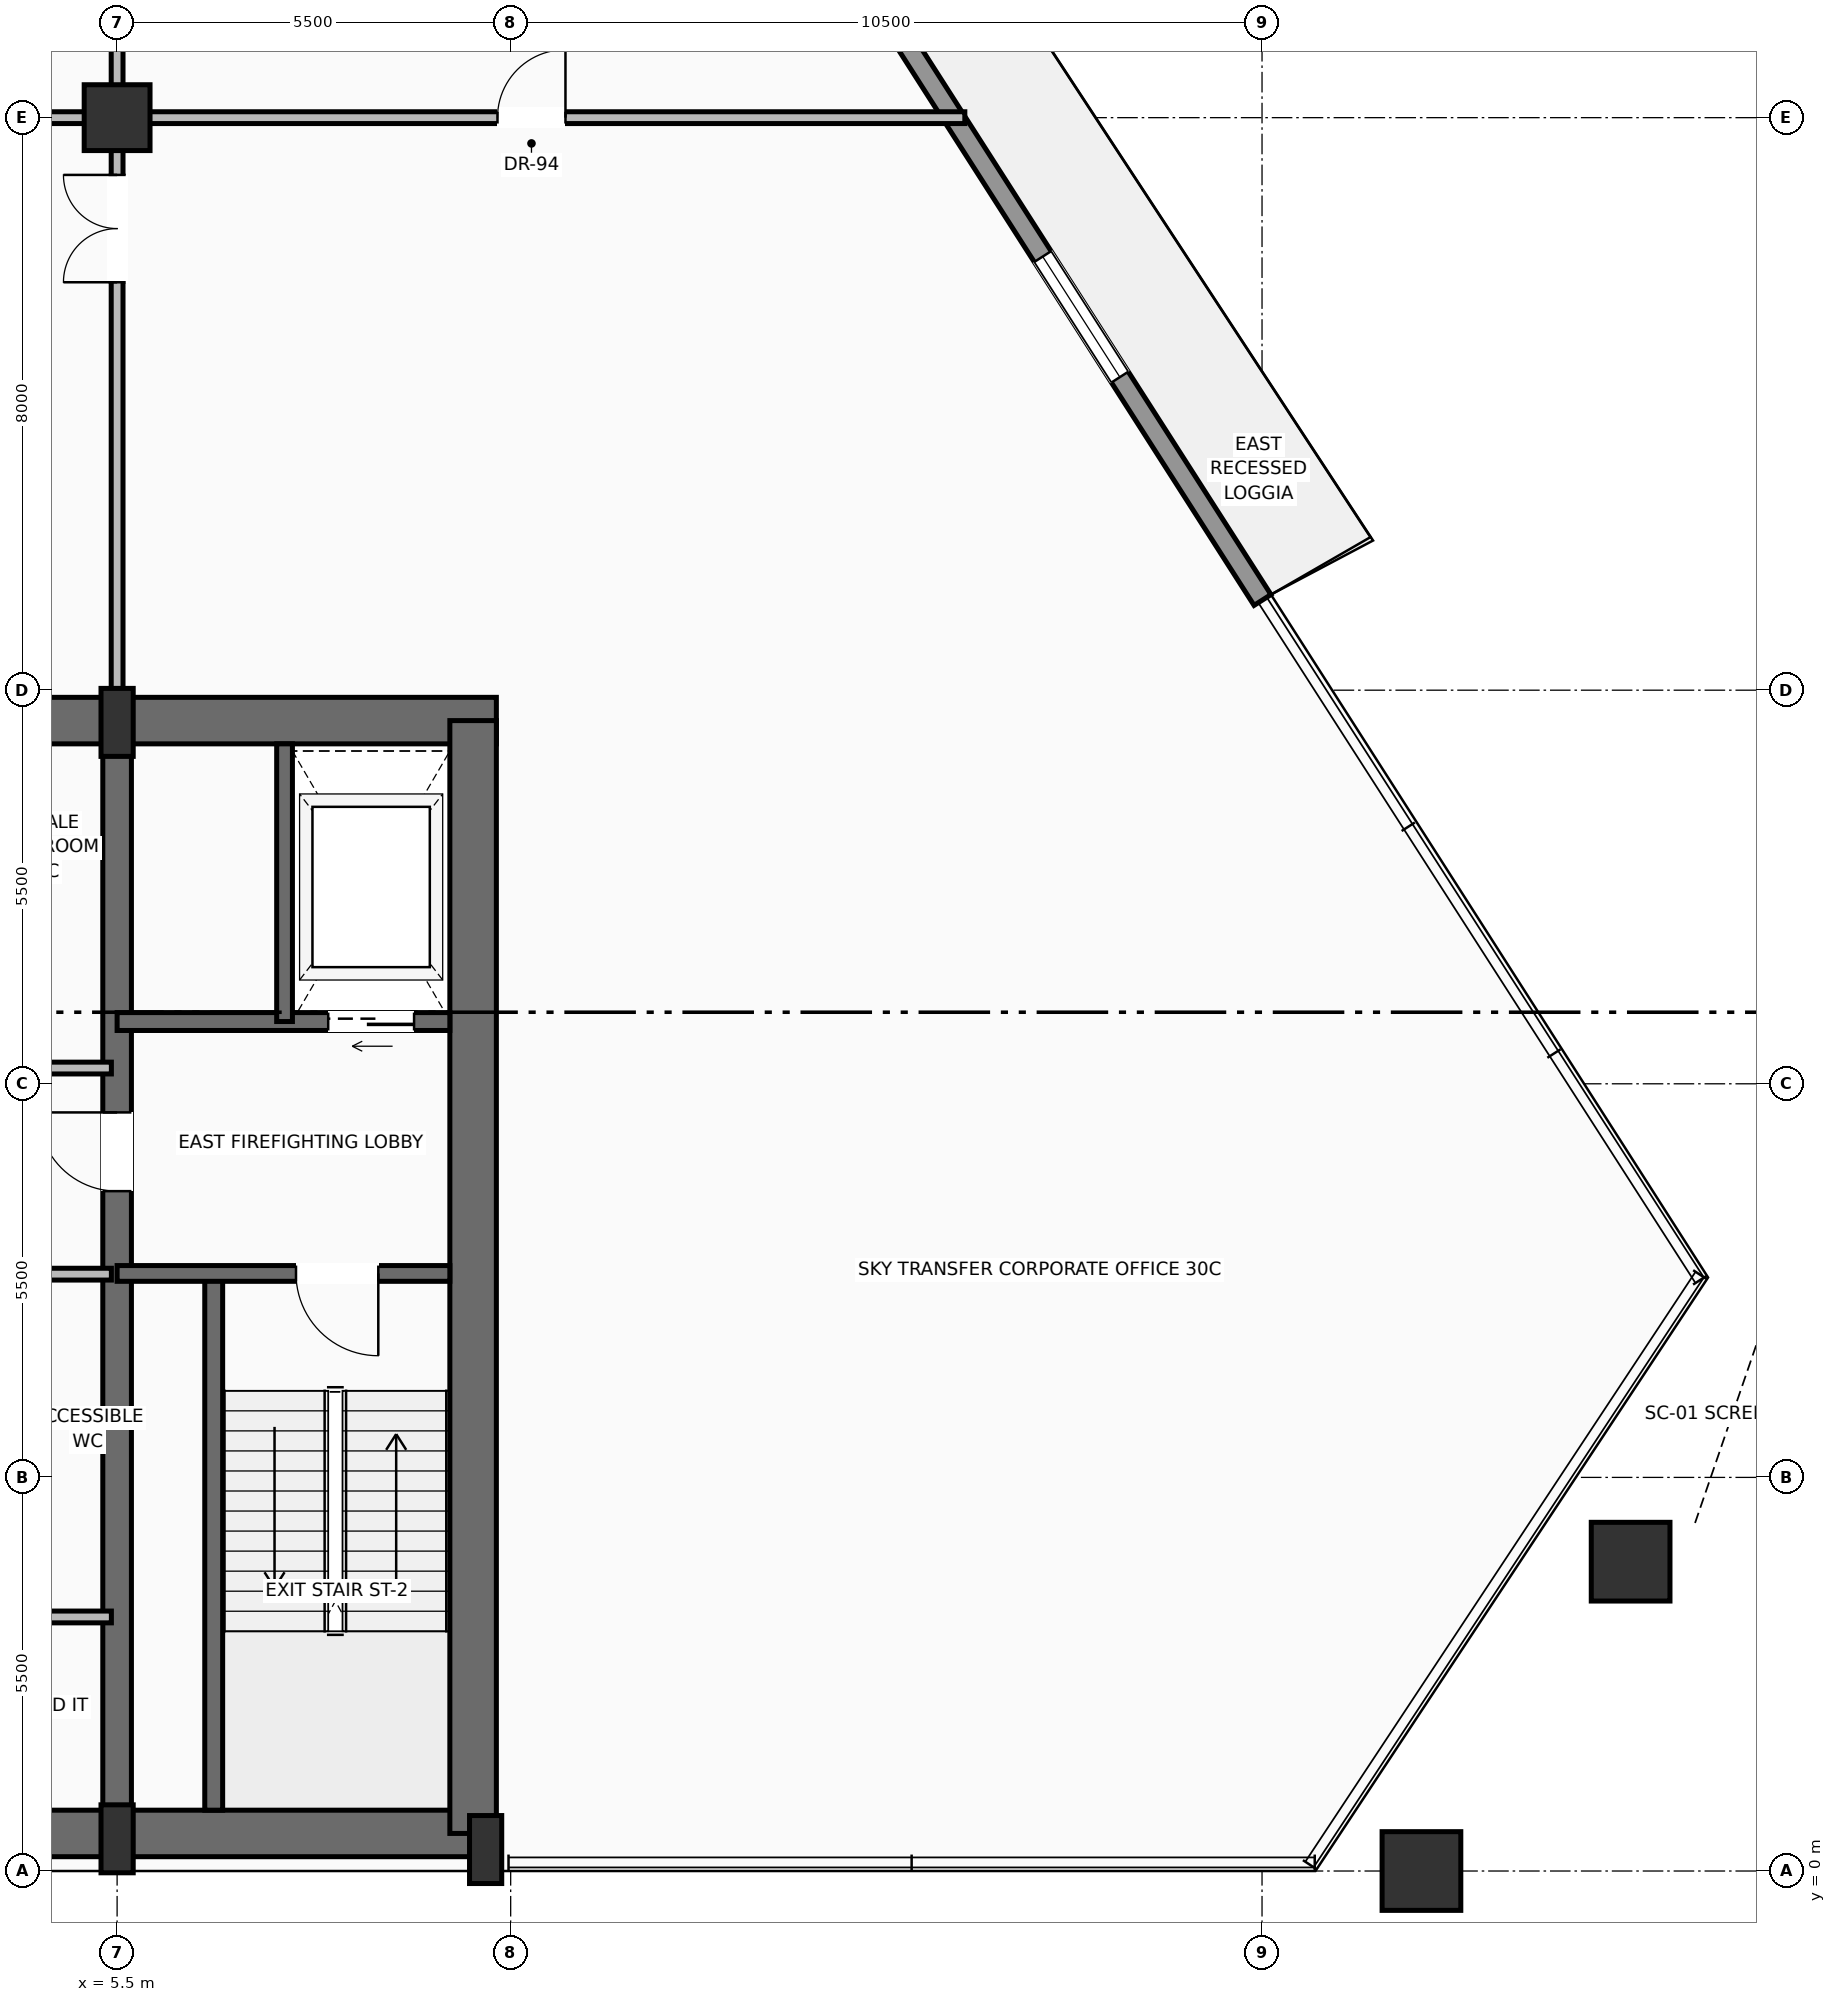
"""IFC4 building model, lengths in metres.
Left out: names, types, materials, properties, quantities, classifications, styles, units other than length and angle.
Written with IfcOpenShell. Run it as: python <this file> out.ifc"""

import sys

from ifc_helpers import new_model, si_unit, direction, frame, frame_2d, origin, origin_2d, place, context, subcontext, project, spatial, rectangle, hollow_rectangle, extrude, source, transform, mapped, element, fill, save


model = new_model("IFC4")
c1 = context("Model", 3, precision=1e-05, world=origin(), true_north=direction((0.0, 1.0)))
c2 = subcontext(c1, "Body", "Model", "MODEL_VIEW")
j1 = project(units=[si_unit("LENGTHUNIT", "METRE"), si_unit("PLANEANGLEUNIT", "RADIAN")], contexts=[c1])
p1 = place(None, origin())
s1 = spatial("IfcSite", under=j1, at=p1, CompositionType="ELEMENT")
p2 = place(p1, origin())
s2 = spatial("IfcBuilding", under=s1, at=p2, CompositionType="ELEMENT")
p3 = place(p2, frame((0.0, 0.0, 121.0)))
s3 = spatial("IfcBuildingStorey", under=s2, at=p3, CompositionType="ELEMENT", Elevation=121.0)
p4 = place(p3, frame((-10.65, 0.525, 0.0), z_axis=(0.0, 0.0, 1.0), x_axis=(1.0, 0.0, 0.0)))
e1 = element("IfcWall", 1, at=p4, inside=s3, PredefinedType="SHEAR", context=c2, shape_type="SweptSolid", body=[
    extrude(rectangle(XDim=21.3, YDim=0.65, at=frame_2d((10.65, 0.0))), origin(), (0.0, 0.0, 1.0), 4.37),
])
p5 = place(p3, frame((-10.8, 16.075, 0.0), z_axis=(0.0, 0.0, 1.0), x_axis=(1.0, 0.0, 0.0)))
e2 = element("IfcWall", 2, at=p5, inside=s3, PredefinedType="SHEAR", context=c2, shape_type="SweptSolid", body=[
    extrude(rectangle(XDim=21.6, YDim=0.65, at=frame_2d((10.8, 0.0))), origin(), (0.0, 0.0, 1.0), 4.37),
])
p6 = place(p5, frame((3.37, 0.0, 0.0)))
e3 = element("IfcOpeningElement", 3, at=p6, cuts=e2, PredefinedType="OPENING", context=c2, shape_type="SweptSolid", body=[
    extrude(rectangle(XDim=1.3, YDim=2.3, at=frame_2d((0.65, 1.15))), frame((0.0, 0.335, 0.0), z_axis=(0.0, -1.0, 0.0), x_axis=(1.0, 0.0, 0.0)), (0.0, 0.0, 1.0), 0.67),
])
p7 = place(p5, frame((9.8, 0.0, 0.0)))
e4 = element("IfcOpeningElement", 4, at=p7, cuts=e2, PredefinedType="OPENING", context=c2, shape_type="SweptSolid", body=[
    extrude(rectangle(XDim=2.0, YDim=2.4, at=frame_2d((1.0, 1.2))), frame((0.0, 0.335, 0.0), z_axis=(0.0, -1.0, 0.0), x_axis=(1.0, 0.0, 0.0)), (0.0, 0.0, 1.0), 0.67),
])
p8 = place(p3, frame((10.475, 0.525, 0.0), z_axis=(0.0, 0.0, 1.0), x_axis=(0.0, 1.0, 0.0)))
e5 = element("IfcWall", 5, at=p8, inside=s3, PredefinedType="SHEAR", context=c2, shape_type="SweptSolid", body=[
    extrude(rectangle(XDim=15.55, YDim=0.65, at=frame_2d((7.775, 0.0))), origin(), (0.0, 0.0, 1.0), 4.37),
])
p9 = place(p3, frame((5.5, 0.525, 0.0), z_axis=(0.0, 0.0, 1.0), x_axis=(0.0, 1.0, 0.0)))
e6 = element("IfcWall", 6, at=p9, inside=s3, PredefinedType="SHEAR", context=c2, shape_type="SweptSolid", body=[
    extrude(rectangle(XDim=15.55, YDim=0.4, at=frame_2d((7.775, 0.0))), origin(), (0.0, 0.0, 1.0), 4.37),
])
p10 = place(p9, frame((8.975, 0.0, 0.0)))
e7 = element("IfcOpeningElement", 7, at=p10, cuts=e6, PredefinedType="OPENING", context=c2, shape_type="SweptSolid", body=[
    extrude(rectangle(XDim=1.1, YDim=2.2, at=frame_2d((0.55, 1.1))), frame((0.0, 0.21, 0.0), z_axis=(0.0, -1.0, 0.0), x_axis=(1.0, 0.0, 0.0)), (0.0, 0.0, 1.0), 0.42),
])
m1 = source(origin(), c2, "Body", "SweptSolid", [
    extrude(rectangle(XDim=0.45, YDim=0.95, at=origin_2d()), origin(), (0.0, 0.0, 1.0), 4.6),
])
for number, where, z_axis, x_axis in (
    (8, (5.5, 0.45, 0.0), (0.0, 0.0, 1.0), (1.0, 0.0, 0.0)),
    (9, (10.65, 0.3, 0.0), (0.0, 0.0, 1.0), (1.0, 0.0, 0.0)),
    (10, (5.5, 16.05, 0.0), (0.0, 0.0, 1.0), (1.0, 0.0, 0.0)),
):
    element("IfcColumn", number, at=place(p3, frame(where, z_axis=z_axis, x_axis=x_axis)), inside=s3, PredefinedType="PILASTER", context=c2, shape_type="MappedRepresentation", body=[
        mapped(m1, transform((0.0, 0.0, 0.0), scale=1.0)),
    ])
m2 = source(origin(), c2, "Body", "SweptSolid", [
    extrude(hollow_rectangle(XDim=1.1, YDim=1.1, WallThickness=0.055, at=origin_2d()), origin(), (0.0, 0.0, 1.0), 4.592),
])
p11 = place(p3, frame((23.728, 0.0, 0.004), z_axis=(0.010102642972, 0.0, 0.999948967), x_axis=(0.0, 1.0, 0.0)))
e11 = element("IfcColumn", 11, at=p11, inside=s3, PredefinedType="COLUMN", context=c2, shape_type="MappedRepresentation", body=[
    mapped(m2, transform((0.0, 0.0, 0.0), scale=1.0)),
])
m3 = source(origin(), c2, "Body", "SweptSolid", [
    extrude(hollow_rectangle(XDim=1.1, YDim=1.1, WallThickness=0.055, at=origin_2d()), origin(), (0.0, 0.0, 1.0), 4.592),
])
p12 = place(p3, frame((26.651, 4.323, 0.004), z_axis=(-0.002498889233, -0.015631349671, 0.99987470038), x_axis=(0.987461582434, -0.157859504675, 0.0)))
e12 = element("IfcColumn", 12, at=p12, inside=s3, PredefinedType="COLUMN", context=c2, shape_type="MappedRepresentation", body=[
    mapped(m3, transform((0.0, 0.0, 0.0), scale=1.0)),
])
m4 = source(origin(), c2, "Body", "SweptSolid", [
    extrude(rectangle(XDim=0.92, YDim=0.92, at=origin_2d()), origin(), (0.0, 0.0, 1.0), 4.6),
])
p13 = place(p3, frame((5.5, 24.5, 0.0), z_axis=(0.0, 0.0, 1.0), x_axis=(1.0, 0.0, 0.0)))
e13 = element("IfcColumn", 13, at=p13, inside=s3, PredefinedType="COLUMN", context=c2, shape_type="MappedRepresentation", body=[
    mapped(m4, transform((0.0, 0.0, 0.0), scale=1.0)),
])
p14 = place(p3, frame((11.907, 32.756, 0.0), z_axis=(0.0, 0.0, 1.0), x_axis=(0.53916264221, -0.842201665425, 0.0)))
e14 = element("IfcWall", 14, at=p14, inside=s3, PredefinedType="SOLIDWALL", context=c2, shape_type="SweptSolid", body=[
    extrude(rectangle(XDim=17.805, YDim=0.28, at=frame_2d((8.902, 0.0))), origin(), (0.0, 0.0, 1.0), 3.95),
])
p15 = place(p14, frame((4.273, 0.0, 0.0)))
e15 = element("IfcOpeningElement", 15, at=p15, cuts=e14, PredefinedType="OPENING", context=c2, shape_type="SweptSolid", body=[
    extrude(rectangle(XDim=1.6, YDim=2.35, at=frame_2d((0.8, 1.175))), frame((0.0, 0.15, 0.0), z_axis=(0.0, -1.0, 0.0), x_axis=(1.0, 0.0, 0.0)), (0.0, 0.0, 1.0), 0.3),
])
p16 = place(p14, frame((12.107, 0.0, 0.9)))
e16 = element("IfcOpeningElement", 16, at=p16, cuts=e14, PredefinedType="OPENING", context=c2, shape_type="SweptSolid", body=[
    extrude(rectangle(XDim=2.0, YDim=1.55, at=frame_2d((1.0, 0.775))), frame((0.0, 0.15, 0.0), z_axis=(0.0, -1.0, 0.0), x_axis=(1.0, 0.0, 0.0)), (0.0, 0.0, 1.0), 0.3),
])
p17 = place(p3, frame((6.85, 0.85, 0.0), z_axis=(0.0, 0.0, 1.0), x_axis=(0.0, 1.0, 0.0)))
e17 = element("IfcWall", 17, at=p17, inside=s3, PredefinedType="SOLIDWALL", context=c2, shape_type="SweptSolid", body=[
    extrude(rectangle(XDim=7.5, YDim=0.25, at=frame_2d((3.75, 0.0))), origin(), (0.0, 0.0, 1.0), 4.37),
])
p18 = place(p3, frame((10.15, 8.35, 0.0), z_axis=(0.0, 0.0, 1.0), x_axis=(-1.0, 0.0, 0.0)))
e18 = element("IfcWall", 18, at=p18, inside=s3, PredefinedType="SOLIDWALL", context=c2, shape_type="SweptSolid", body=[
    extrude(rectangle(XDim=4.65, YDim=0.22, at=frame_2d((2.325, 0.0))), origin(), (0.0, 0.0, 1.0), 4.37),
])
p19 = place(p18, frame((1.0, 0.0, 0.0)))
e19 = element("IfcOpeningElement", 19, at=p19, cuts=e18, PredefinedType="OPENING", context=c2, shape_type="SweptSolid", body=[
    extrude(rectangle(XDim=1.15, YDim=2.2, at=frame_2d((0.575, 1.1))), frame((0.0, 0.12, 0.0), z_axis=(0.0, -1.0, 0.0), x_axis=(1.0, 0.0, 0.0)), (0.0, 0.0, 1.0), 0.24),
])
p20 = place(p3, frame((10.15, 11.87, 0.0), z_axis=(0.0, 0.0, 1.0), x_axis=(-1.0, 0.0, 0.0)))
e20 = element("IfcWall", 20, at=p20, inside=s3, PredefinedType="SOLIDWALL", context=c2, shape_type="SweptSolid", body=[
    extrude(rectangle(XDim=4.65, YDim=0.25, at=frame_2d((2.325, 0.0))), origin(), (0.0, 0.0, 1.0), 4.37),
])
p21 = place(p20, frame((0.5, 0.0, 0.0)))
e21 = element("IfcOpeningElement", 21, at=p21, cuts=e20, PredefinedType="OPENING", context=c2, shape_type="SweptSolid", body=[
    extrude(rectangle(XDim=1.2, YDim=2.25, at=frame_2d((0.6, 1.125))), frame((0.0, 0.135, 0.0), z_axis=(0.0, -1.0, 0.0), x_axis=(1.0, 0.0, 0.0)), (0.0, 0.0, 1.0), 0.27),
])
p22 = place(p3, frame((7.84, 11.87, 0.0), z_axis=(0.0, 0.0, 1.0), x_axis=(0.0, 1.0, 0.0)))
e22 = element("IfcWall", 22, at=p22, inside=s3, PredefinedType="SOLIDWALL", context=c2, shape_type="SweptSolid", body=[
    extrude(rectangle(XDim=3.88, YDim=0.22, at=frame_2d((1.94, 0.0))), origin(), (0.0, 0.0, 1.0), 4.37),
])
p23 = place(p3, frame((3.54, 8.34, 0.0), z_axis=(0.0, 0.0, 1.0), x_axis=(1.0, 0.0, 0.0)))
e23 = element("IfcWall", 23, at=p23, inside=s3, PredefinedType="PARTITIONING", context=c2, shape_type="SweptSolid", body=[
    extrude(rectangle(XDim=1.88, YDim=0.165, at=frame_2d((0.94, 0.0))), origin(), (0.0, 0.0, 1.0), 4.362),
])
p24 = place(p3, frame((1.8, 3.55, 0.0), z_axis=(0.0, 0.0, 1.0), x_axis=(1.0, 0.0, 0.0)))
e24 = element("IfcWall", 24, at=p24, inside=s3, PredefinedType="PARTITIONING", context=c2, shape_type="SweptSolid", body=[
    extrude(rectangle(XDim=3.62, YDim=0.165, at=frame_2d((1.81, 0.0))), origin(), (0.0, 0.0, 1.0), 4.362),
])
p25 = place(p24, frame((0.48, 0.0, 0.0)))
e25 = element("IfcOpeningElement", 25, at=p25, cuts=e24, PredefinedType="OPENING", context=c2, shape_type="SweptSolid", body=[
    extrude(rectangle(XDim=0.9, YDim=2.1, at=frame_2d((0.45, 1.05))), frame((0.0, 0.093, 0.0), z_axis=(0.0, -1.0, 0.0), x_axis=(1.0, 0.0, 0.0)), (0.0, 0.0, 1.0), 0.185),
])
p26 = place(p3, frame((3.54, 11.22, 0.0), z_axis=(0.0, 0.0, 1.0), x_axis=(1.0, 0.0, 0.0)))
e26 = element("IfcWall", 26, at=p26, inside=s3, PredefinedType="PARTITIONING", context=c2, shape_type="SweptSolid", body=[
    extrude(rectangle(XDim=1.88, YDim=0.165, at=frame_2d((0.94, 0.0))), origin(), (0.0, 0.0, 1.0), 4.362),
])
p27 = place(p3, frame((-16.822, 24.5, 0.0), z_axis=(0.0, 0.0, 1.0), x_axis=(1.0, 0.0, 0.0)))
e27 = element("IfcWall", 27, at=p27, inside=s3, PredefinedType="PARTITIONING", context=c2, shape_type="SweptSolid", body=[
    extrude(rectangle(XDim=34.168, YDim=0.165, at=frame_2d((17.084, 0.0))), origin(), (0.0, 0.0, 1.0), 3.746),
])
p28 = place(p27, frame((16.084, 0.0, 0.0)))
e28 = element("IfcOpeningElement", 28, at=p28, cuts=e27, PredefinedType="OPENING", context=c2, shape_type="SweptSolid", body=[
    extrude(rectangle(XDim=2.0, YDim=2.4, at=frame_2d((1.0, 1.2))), frame((0.0, 0.093, 0.0), z_axis=(0.0, -1.0, 0.0), x_axis=(1.0, 0.0, 0.0)), (0.0, 0.0, 1.0), 0.185),
])
p29 = place(p27, frame((5.326, 0.0, 0.0)))
e29 = element("IfcOpeningElement", 29, at=p29, cuts=e27, PredefinedType="OPENING", context=c2, shape_type="SweptSolid", body=[
    extrude(rectangle(XDim=0.95, YDim=2.2, at=frame_2d((0.475, 1.1))), frame((0.0, 0.093, 0.0), z_axis=(0.0, -1.0, 0.0), x_axis=(1.0, 0.0, 0.0)), (0.0, 0.0, 1.0), 0.185),
])
p30 = place(p27, frame((27.637, 0.0, 0.0)))
e30 = element("IfcOpeningElement", 30, at=p30, cuts=e27, PredefinedType="OPENING", context=c2, shape_type="SweptSolid", body=[
    extrude(rectangle(XDim=0.95, YDim=2.2, at=frame_2d((0.475, 1.1))), frame((0.0, 0.093, 0.0), z_axis=(0.0, -1.0, 0.0), x_axis=(1.0, 0.0, 0.0)), (0.0, 0.0, 1.0), 0.185),
])
p31 = place(p3, frame((5.5, 16.42, 0.0), z_axis=(0.0, 0.0, 1.0), x_axis=(0.0, 1.0, 0.0)))
e31 = element("IfcWall", 31, at=p31, inside=s3, PredefinedType="PARTITIONING", context=c2, shape_type="SweptSolid", body=[
    extrude(rectangle(XDim=25.943, YDim=0.165, at=frame_2d((12.972, 0.0))), origin(), (0.0, 0.0, 1.0), 3.746),
])
p32 = place(p31, frame((5.78, 0.0, 0.0)))
e32 = element("IfcOpeningElement", 32, at=p32, cuts=e31, PredefinedType="OPENING", context=c2, shape_type="SweptSolid", body=[
    extrude(rectangle(XDim=1.5, YDim=2.25, at=frame_2d((0.75, 1.125))), frame((0.0, 0.093, 0.0), z_axis=(0.0, -1.0, 0.0), x_axis=(1.0, 0.0, 0.0)), (0.0, 0.0, 1.0), 0.185),
])
p33 = place(p31, frame((19.929, 0.0, 0.0)))
e33 = element("IfcOpeningElement", 33, at=p33, cuts=e31, PredefinedType="OPENING", context=c2, shape_type="SweptSolid", body=[
    extrude(rectangle(XDim=0.95, YDim=2.2, at=frame_2d((0.475, 1.1))), frame((0.0, 0.093, 0.0), z_axis=(0.0, -1.0, 0.0), x_axis=(1.0, 0.0, 0.0)), (0.0, 0.0, 1.0), 0.185),
])
m5 = source(origin(), c2, "Body", "SweptSolid", [
    extrude(rectangle(XDim=2.0, YDim=1.55, at=frame_2d((1.0, 0.775))), frame((0.0, 0.03, 0.0), z_axis=(0.0, -1.0, 0.0), x_axis=(1.0, 0.0, 0.0)), (0.0, 0.0, 1.0), 0.06),
])
p34 = place(p16, origin())
e34 = element("IfcWindow", 34, at=p34, inside=s3, PartitioningType="SINGLE_PANEL", PredefinedType="WINDOW", context=c2, shape_type="MappedRepresentation", body=[
    mapped(m5, transform((0.0, 0.0, 0.0), scale=1.0)),
])
fill(e16, e34)
m6 = source(origin(), c2, "Body", "SweptSolid", [
    extrude(rectangle(XDim=1.15, YDim=2.2, at=frame_2d((0.575, 1.1))), frame((0.0, 0.025, 0.0), z_axis=(0.0, -1.0, 0.0), x_axis=(1.0, 0.0, 0.0)), (0.0, 0.0, 1.0), 0.05),
])
p35 = place(p19, origin())
e35 = element("IfcDoor", 35, at=p35, inside=s3, OperationType="SINGLE_SWING_LEFT", PredefinedType="DOOR", context=c2, shape_type="MappedRepresentation", body=[
    mapped(m6, transform((0.0, 0.0, 0.0), scale=1.0)),
])
fill(e19, e35)
m7 = source(origin(), c2, "Body", "SweptSolid", [
    extrude(rectangle(XDim=1.1, YDim=2.2, at=frame_2d((0.55, 1.1))), frame((0.0, 0.025, 0.0), z_axis=(0.0, -1.0, 0.0), x_axis=(1.0, 0.0, 0.0)), (0.0, 0.0, 1.0), 0.05),
])
p36 = place(p10, origin())
e36 = element("IfcDoor", 36, at=p36, inside=s3, OperationType="SINGLE_SWING_RIGHT", PredefinedType="DOOR", context=c2, shape_type="MappedRepresentation", body=[
    mapped(m7, transform((0.0, 0.0, 0.0), scale=1.0)),
])
fill(e7, e36)
m8 = source(origin(), c2, "Body", "SweptSolid", [
    extrude(rectangle(XDim=1.2, YDim=2.25, at=frame_2d((0.6, 1.125))), frame((0.0, 0.025, 0.0), z_axis=(0.0, -1.0, 0.0), x_axis=(1.0, 0.0, 0.0)), (0.0, 0.0, 1.0), 0.05),
])
p37 = place(p21, origin())
e37 = element("IfcDoor", 37, at=p37, inside=s3, OperationType="SLIDING_TO_RIGHT", PredefinedType="DOOR", context=c2, shape_type="MappedRepresentation", body=[
    mapped(m8, transform((0.0, 0.0, 0.0), scale=1.0)),
])
fill(e21, e37)
m9 = source(origin(), c2, "Body", "SweptSolid", [
    extrude(rectangle(XDim=1.5, YDim=2.25, at=frame_2d((0.75, 1.125))), frame((0.0, 0.025, 0.0), z_axis=(0.0, -1.0, 0.0), x_axis=(1.0, 0.0, 0.0)), (0.0, 0.0, 1.0), 0.05),
])
p38 = place(p32, origin())
e38 = element("IfcDoor", 38, at=p38, inside=s3, OperationType="DOUBLE_DOOR_SINGLE_SWING", PredefinedType="DOOR", context=c2, shape_type="MappedRepresentation", body=[
    mapped(m9, transform((0.0, 0.0, 0.0), scale=1.0)),
])
fill(e32, e38)
m10 = source(origin(), c2, "Body", "SweptSolid", [
    extrude(rectangle(XDim=0.95, YDim=2.2, at=frame_2d((0.475, 1.1))), frame((0.0, 0.025, 0.0), z_axis=(0.0, -1.0, 0.0), x_axis=(1.0, 0.0, 0.0)), (0.0, 0.0, 1.0), 0.05),
])
p39 = place(p30, origin())
e39 = element("IfcDoor", 39, at=p39, inside=s3, OperationType="SINGLE_SWING_RIGHT", PredefinedType="DOOR", context=c2, shape_type="MappedRepresentation", body=[
    mapped(m10, transform((0.0, 0.0, 0.0), scale=1.0)),
])
fill(e30, e39)
save(model, sys.argv[1])
